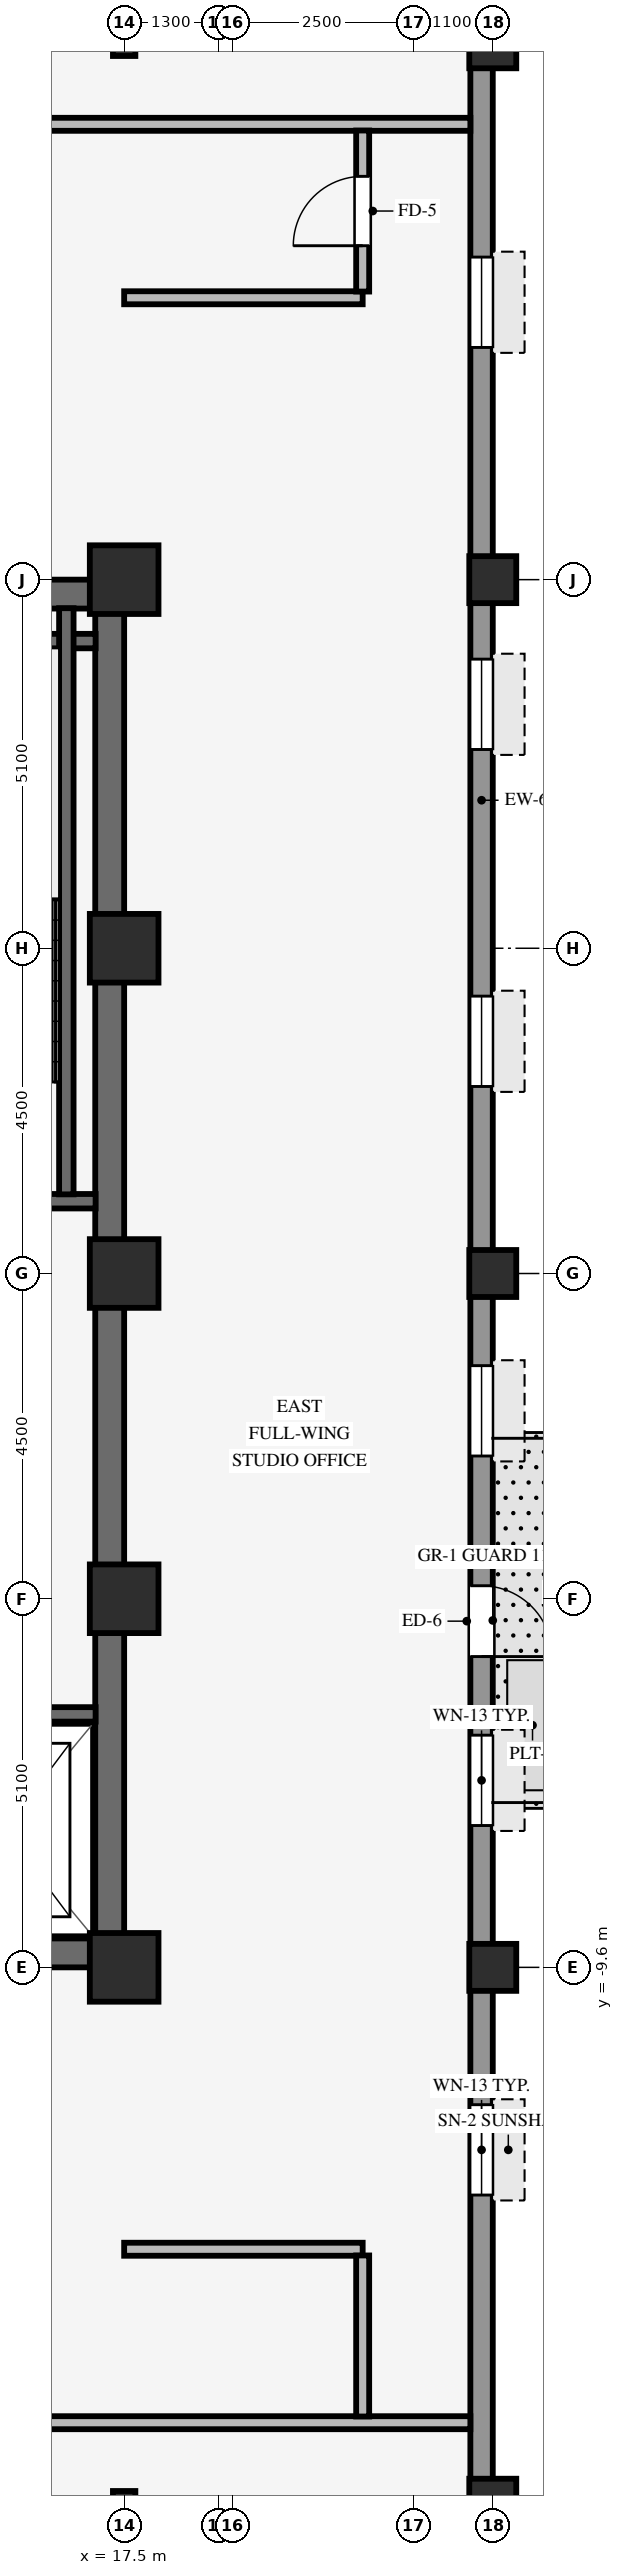
"""IFC4 building model, lengths in metres.
Left out: names, types, materials, properties, quantities, classifications, styles, units other than length and angle.
Written with IfcOpenShell. Run it as: python <this file> out.ifc"""

import sys

from ifc_helpers import new_model, si_unit, direction, frame, frame_2d, origin, origin_2d, place, context, subcontext, project, spatial, rectangle, hollow_rectangle, i_section, extrude, source, transform, mapped, element, fill, save


model = new_model("IFC4")
c1 = context("Model", 3, precision=1e-05, world=origin(), true_north=direction((0.0, 1.0)))
c2 = subcontext(c1, "Body", "Model", "MODEL_VIEW")
j1 = project(units=[si_unit("LENGTHUNIT", "METRE"), si_unit("PLANEANGLEUNIT", "RADIAN")], contexts=[c1])
p1 = place(None, origin())
s1 = spatial("IfcSite", under=j1, at=p1, CompositionType="ELEMENT")
p2 = place(p1, origin())
s2 = spatial("IfcBuilding", under=s1, at=p2, CompositionType="ELEMENT")
p3 = place(p2, frame((0.0, 0.0, 171.3)))
s3 = spatial("IfcBuildingStorey", under=s2, at=p3, CompositionType="ELEMENT", Elevation=171.3)
for number, where, z_axis, x_axis in (
    (1, (9.0, -9.4, 0.0), (0.0, 0.0, 1.0), (1.0, 0.0, 0.0)),
    (2, (9.0, 9.4, 0.0), (0.0, 0.0, 1.0), (1.0, 0.0, 0.0)),
):
    element("IfcWall", number, at=place(p3, frame(where, z_axis=z_axis, x_axis=x_axis)), inside=s3, PredefinedType="SHEAR", context=c2, shape_type="SweptSolid", body=[
        extrude(rectangle(XDim=8.5, YDim=0.4, at=frame_2d((4.25, 0.0))), origin(), (0.0, 0.0, 1.0), 3.37),
    ])
p4 = place(p3, frame((17.3, -9.205, 0.0), z_axis=(0.0, 0.0, 1.0), x_axis=(0.0, 1.0, 0.0)))
e3 = element("IfcWall", 3, at=p4, inside=s3, PredefinedType="SHEAR", context=c2, shape_type="SweptSolid", body=[
    extrude(rectangle(XDim=18.41, YDim=0.4, at=frame_2d((9.205, 0.0))), origin(), (0.0, 0.0, 1.0), 3.37),
])
for number, where, z_axis, x_axis in (
    (4, (17.5, -9.6, 0.0), (0.0, 0.0, 1.0), (1.0, 0.0, 0.0)),
    (5, (17.5, -4.5, 0.0), (0.0, 0.0, 1.0), (1.0, 0.0, 0.0)),
    (6, (17.5, 4.5, 0.0), (0.0, 0.0, 1.0), (1.0, 0.0, 0.0)),
    (7, (17.5, 9.6, 0.0), (0.0, 0.0, 1.0), (1.0, 0.0, 0.0)),
    (8, (17.5, 0.0, 0.0), (0.0, 0.0, 1.0), (1.0, 0.0, 0.0)),
):
    element("IfcColumn", number, at=place(p3, frame(where, z_axis=z_axis, x_axis=x_axis)), inside=s3, PredefinedType="COLUMN", context=c2, shape_type="SweptSolid", body=[
        extrude(rectangle(XDim=0.95, YDim=0.95, at=origin_2d()), origin(), (0.0, 0.0, 1.0), 3.37),
    ])
for number, where, z_axis, x_axis in (
    (9, (22.6, -17.0, 0.0), (0.0, 0.0, 1.0), (1.0, 0.0, 0.0)),
    (10, (22.6, -9.6, 0.0), (0.0, 0.0, 1.0), (1.0, 0.0, 0.0)),
    (11, (22.6, 0.0, 0.0), (0.0, 0.0, 1.0), (1.0, 0.0, 0.0)),
    (12, (22.6, 9.6, 0.0), (0.0, 0.0, 1.0), (1.0, 0.0, 0.0)),
    (13, (22.6, 17.0, 0.0), (0.0, 0.0, 1.0), (1.0, 0.0, 0.0)),
):
    element("IfcColumn", number, at=place(p3, frame(where, z_axis=z_axis, x_axis=x_axis)), inside=s3, PredefinedType="COLUMN", context=c2, shape_type="SweptSolid", body=[
        extrude(hollow_rectangle(XDim=0.65, YDim=0.65, WallThickness=0.04, InnerFilletRadius=0.04, OuterFilletRadius=0.08, at=origin_2d()), origin(), (0.0, 0.0, 1.0), 3.37),
    ])
for number, where, z_axis, x_axis in (
    (14, (17.5, -17.0, 0.0), (0.0, 0.0, 1.0), (1.0, 0.0, 0.0)),
    (15, (17.5, 17.0, 0.0), (0.0, 0.0, 1.0), (1.0, 0.0, 0.0)),
):
    element("IfcColumn", number, at=place(p3, frame(where, z_axis=z_axis, x_axis=x_axis)), inside=s3, PredefinedType="COLUMN", context=c2, shape_type="SweptSolid", body=[
        extrude(i_section(OverallWidth=0.31, OverallDepth=0.31, WebThickness=0.015, FlangeThickness=0.015, FilletRadius=0.015, at=origin_2d()), origin(), (0.0, 0.0, 1.0), 3.37),
    ])
p5 = place(p3, frame((22.445, -20.794, 0.0), z_axis=(0.0, 0.0, 1.0), x_axis=(0.0, 1.0, 0.0)))
e16 = element("IfcWall", 16, at=p5, inside=s3, PredefinedType="STANDARD", context=c2, shape_type="SweptSolid", body=[
    extrude(rectangle(XDim=37.788, YDim=0.31, at=frame_2d((18.894, 0.0))), origin(), (0.0, 0.0, 1.0), 2.705),
])
p6 = place(p5, frame((16.474, 0.0, 0.0), z_axis=(0.0, 0.0, 1.0), x_axis=(-1.0, 0.0, 0.0)))
e17 = element("IfcOpeningElement", 17, at=p6, cuts=e16, PredefinedType="OPENING", context=c2, shape_type="SweptSolid", body=[
    extrude(rectangle(XDim=0.98, YDim=2.15, at=frame_2d((0.49, 1.075))), frame((0.0, 0.165, 0.0), z_axis=(0.0, -1.0, 0.0), x_axis=(1.0, 0.0, 0.0)), (0.0, 0.0, 1.0), 0.33),
])
p7 = place(p5, frame((1.581, 0.0, 0.8)))
e18 = element("IfcOpeningElement", 18, at=p7, cuts=e16, PredefinedType="OPENING", context=c2, shape_type="SweptSolid", body=[
    extrude(rectangle(XDim=1.25, YDim=1.52, at=frame_2d((0.625, 0.76))), frame((0.0, 0.165, 0.0), z_axis=(0.0, -1.0, 0.0), x_axis=(1.0, 0.0, 0.0)), (0.0, 0.0, 1.0), 0.33),
])
p8 = place(p5, frame((8.044, 0.0, 0.8)))
e19 = element("IfcOpeningElement", 19, at=p8, cuts=e16, PredefinedType="OPENING", context=c2, shape_type="SweptSolid", body=[
    extrude(rectangle(XDim=1.25, YDim=1.52, at=frame_2d((0.625, 0.76))), frame((0.0, 0.165, 0.0), z_axis=(0.0, -1.0, 0.0), x_axis=(1.0, 0.0, 0.0)), (0.0, 0.0, 1.0), 0.33),
])
p9 = place(p5, frame((13.156, 0.0, 0.8)))
e20 = element("IfcOpeningElement", 20, at=p9, cuts=e16, PredefinedType="OPENING", context=c2, shape_type="SweptSolid", body=[
    extrude(rectangle(XDim=1.25, YDim=1.52, at=frame_2d((0.625, 0.76))), frame((0.0, 0.165, 0.0), z_axis=(0.0, -1.0, 0.0), x_axis=(1.0, 0.0, 0.0)), (0.0, 0.0, 1.0), 0.33),
])
p10 = place(p5, frame((18.269, 0.0, 0.8)))
e21 = element("IfcOpeningElement", 21, at=p10, cuts=e16, PredefinedType="OPENING", context=c2, shape_type="SweptSolid", body=[
    extrude(rectangle(XDim=1.25, YDim=1.52, at=frame_2d((0.625, 0.76))), frame((0.0, 0.165, 0.0), z_axis=(0.0, -1.0, 0.0), x_axis=(1.0, 0.0, 0.0)), (0.0, 0.0, 1.0), 0.33),
])
p11 = place(p5, frame((23.382, 0.0, 0.8)))
e22 = element("IfcOpeningElement", 22, at=p11, cuts=e16, PredefinedType="OPENING", context=c2, shape_type="SweptSolid", body=[
    extrude(rectangle(XDim=1.25, YDim=1.52, at=frame_2d((0.625, 0.76))), frame((0.0, 0.165, 0.0), z_axis=(0.0, -1.0, 0.0), x_axis=(1.0, 0.0, 0.0)), (0.0, 0.0, 1.0), 0.33),
])
p12 = place(p5, frame((28.044, 0.0, 0.8)))
e23 = element("IfcOpeningElement", 23, at=p12, cuts=e16, PredefinedType="OPENING", context=c2, shape_type="SweptSolid", body=[
    extrude(rectangle(XDim=1.25, YDim=1.52, at=frame_2d((0.625, 0.76))), frame((0.0, 0.165, 0.0), z_axis=(0.0, -1.0, 0.0), x_axis=(1.0, 0.0, 0.0)), (0.0, 0.0, 1.0), 0.33),
])
p13 = place(p5, frame((33.607, 0.0, 0.8)))
e24 = element("IfcOpeningElement", 24, at=p13, cuts=e16, PredefinedType="OPENING", context=c2, shape_type="SweptSolid", body=[
    extrude(rectangle(XDim=1.25, YDim=1.52, at=frame_2d((0.625, 0.76))), frame((0.0, 0.165, 0.0), z_axis=(0.0, -1.0, 0.0), x_axis=(1.0, 0.0, 0.0)), (0.0, 0.0, 1.0), 0.33),
])
for number, where, z_axis, x_axis in (
    (25, (13.535, 1.0, 0.0), (0.0, 0.0, 1.0), (1.0, 0.0, 0.0)),
    (26, (13.535, 8.75, 0.0), (0.0, 0.0, 1.0), (1.0, 0.0, 0.0)),
):
    element("IfcWall", number, at=place(p3, frame(where, z_axis=z_axis, x_axis=x_axis)), inside=s3, PredefinedType="SHEAR", context=c2, shape_type="SweptSolid", body=[
        extrude(rectangle(XDim=3.57, YDim=0.2, at=frame_2d((1.785, 0.0))), origin(), (0.0, 0.0, 1.0), 3.37),
    ])
p14 = place(p3, frame((16.7, 1.095, 0.0), z_axis=(0.0, 0.0, 1.0), x_axis=(0.0, 1.0, 0.0)))
e27 = element("IfcWall", 27, at=p14, inside=s3, PredefinedType="SHEAR", context=c2, shape_type="SweptSolid", body=[
    extrude(rectangle(XDim=8.11, YDim=0.2, at=frame_2d((4.055, 0.0))), origin(), (0.0, 0.0, 1.0), 3.37),
])
p15 = place(p3, frame((14.645, -6.1, 0.0), z_axis=(0.0, 0.0, 1.0), x_axis=(1.0, 0.0, 0.0)))
e28 = element("IfcWall", 28, at=p15, inside=s3, PredefinedType="SHEAR", context=c2, shape_type="SweptSolid", body=[
    extrude(rectangle(XDim=2.46, YDim=0.2, at=frame_2d((1.23, 0.0))), origin(), (0.0, 0.0, 1.0), 3.37),
])
p16 = place(p3, frame((-26.09, -15.9, 0.0), z_axis=(0.0, 0.0, 1.0), x_axis=(1.0, 0.0, 0.0)))
e29 = element("IfcWall", 29, at=p16, inside=s3, PredefinedType="PARTITIONING", context=c2, shape_type="SweptSolid", body=[
    extrude(rectangle(XDim=48.38, YDim=0.18, at=frame_2d((24.19, 0.0))), origin(), (0.0, 0.0, 1.0), 3.36),
])
p17 = place(p16, frame((26.51, 0.0, 0.0)))
e30 = element("IfcOpeningElement", 30, at=p17, cuts=e29, PredefinedType="OPENING", context=c2, shape_type="SweptSolid", body=[
    extrude(rectangle(XDim=0.96, YDim=2.1, at=frame_2d((0.48, 1.05))), frame((0.0, 0.1, 0.0), z_axis=(0.0, -1.0, 0.0), x_axis=(1.0, 0.0, 0.0)), (0.0, 0.0, 1.0), 0.2),
])
p18 = place(p16, frame((40.51, 0.0, 0.0)))
e31 = element("IfcOpeningElement", 31, at=p18, cuts=e29, PredefinedType="OPENING", context=c2, shape_type="SweptSolid", body=[
    extrude(rectangle(XDim=0.96, YDim=2.1, at=frame_2d((0.48, 1.05))), frame((0.0, 0.1, 0.0), z_axis=(0.0, -1.0, 0.0), x_axis=(1.0, 0.0, 0.0)), (0.0, 0.0, 1.0), 0.2),
])
p19 = place(p16, frame((13.62, 0.0, 0.0)))
e32 = element("IfcOpeningElement", 32, at=p19, cuts=e29, PredefinedType="OPENING", context=c2, shape_type="SweptSolid", body=[
    extrude(rectangle(XDim=0.96, YDim=2.1, at=frame_2d((0.48, 1.05))), frame((0.0, 0.1, 0.0), z_axis=(0.0, -1.0, 0.0), x_axis=(1.0, 0.0, 0.0)), (0.0, 0.0, 1.0), 0.2),
])
for number, where, z_axis, x_axis in (
    (33, (17.5, -13.5, 0.0), (0.0, 0.0, 1.0), (1.0, 0.0, 0.0)),
    (34, (17.5, 13.5, 0.0), (0.0, 0.0, 1.0), (1.0, 0.0, 0.0)),
):
    element("IfcWall", number, at=place(p3, frame(where, z_axis=z_axis, x_axis=x_axis)), inside=s3, PredefinedType="PARTITIONING", context=c2, shape_type="SweptSolid", body=[
        extrude(rectangle(XDim=3.3, YDim=0.18, at=frame_2d((1.65, 0.0))), origin(), (0.0, 0.0, 1.0), 3.008),
    ])
p20 = place(p3, frame((-26.09, 15.9, 0.0), z_axis=(0.0, 0.0, 1.0), x_axis=(1.0, 0.0, 0.0)))
e35 = element("IfcWall", 35, at=p20, inside=s3, PredefinedType="PARTITIONING", context=c2, shape_type="SweptSolid", body=[
    extrude(rectangle(XDim=48.38, YDim=0.18, at=frame_2d((24.19, 0.0))), origin(), (0.0, 0.0, 1.0), 3.36),
])
p21 = place(p20, frame((40.51, 0.0, 0.0)))
e36 = element("IfcOpeningElement", 36, at=p21, cuts=e35, PredefinedType="OPENING", context=c2, shape_type="SweptSolid", body=[
    extrude(rectangle(XDim=0.96, YDim=2.1, at=frame_2d((0.48, 1.05))), frame((0.0, 0.1, 0.0), z_axis=(0.0, -1.0, 0.0), x_axis=(1.0, 0.0, 0.0)), (0.0, 0.0, 1.0), 0.2),
])
p22 = place(p20, frame((19.995, 0.0, 0.0)))
e37 = element("IfcOpeningElement", 37, at=p22, cuts=e35, PredefinedType="OPENING", context=c2, shape_type="SweptSolid", body=[
    extrude(rectangle(XDim=0.96, YDim=2.1, at=frame_2d((0.48, 1.05))), frame((0.0, 0.1, 0.0), z_axis=(0.0, -1.0, 0.0), x_axis=(1.0, 0.0, 0.0)), (0.0, 0.0, 1.0), 0.2),
])
p23 = place(p20, frame((28.45, 0.0, 0.0)))
e38 = element("IfcOpeningElement", 38, at=p23, cuts=e35, PredefinedType="OPENING", context=c2, shape_type="SweptSolid", body=[
    extrude(rectangle(XDim=0.96, YDim=2.1, at=frame_2d((0.48, 1.05))), frame((0.0, 0.1, 0.0), z_axis=(0.0, -1.0, 0.0), x_axis=(1.0, 0.0, 0.0)), (0.0, 0.0, 1.0), 0.2),
])
p24 = place(p20, frame((11.605, 0.0, 0.0)))
e39 = element("IfcOpeningElement", 39, at=p24, cuts=e35, PredefinedType="OPENING", context=c2, shape_type="SweptSolid", body=[
    extrude(rectangle(XDim=0.96, YDim=2.1, at=frame_2d((0.48, 1.05))), frame((0.0, 0.1, 0.0), z_axis=(0.0, -1.0, 0.0), x_axis=(1.0, 0.0, 0.0)), (0.0, 0.0, 1.0), 0.2),
])
p25 = place(p20, frame((2.465, 0.0, 0.0)))
e40 = element("IfcOpeningElement", 40, at=p25, cuts=e35, PredefinedType="OPENING", context=c2, shape_type="SweptSolid", body=[
    extrude(rectangle(XDim=0.96, YDim=2.1, at=frame_2d((0.48, 1.05))), frame((0.0, 0.1, 0.0), z_axis=(0.0, -1.0, 0.0), x_axis=(1.0, 0.0, 0.0)), (0.0, 0.0, 1.0), 0.2),
])
p26 = place(p3, frame((20.8, -15.814, 0.0), z_axis=(0.0, 0.0, 1.0), x_axis=(0.0, 1.0, 0.0)))
e41 = element("IfcWall", 41, at=p26, inside=s3, PredefinedType="PARTITIONING", context=c2, shape_type="SweptSolid", body=[
    extrude(rectangle(XDim=2.228, YDim=0.18, at=frame_2d((1.114, 0.0))), origin(), (0.0, 0.0, 1.0), 3.36),
])
p27 = place(p3, frame((20.8, 13.586, 0.0), z_axis=(0.0, 0.0, 1.0), x_axis=(0.0, 1.0, 0.0)))
e42 = element("IfcWall", 42, at=p27, inside=s3, PredefinedType="PARTITIONING", context=c2, shape_type="SweptSolid", body=[
    extrude(rectangle(XDim=2.228, YDim=0.18, at=frame_2d((1.114, 0.0))), origin(), (0.0, 0.0, 1.0), 3.36),
])
p28 = place(p27, frame((0.634, 0.0, 0.0)))
e43 = element("IfcOpeningElement", 43, at=p28, cuts=e42, PredefinedType="OPENING", context=c2, shape_type="SweptSolid", body=[
    extrude(rectangle(XDim=0.96, YDim=2.1, at=frame_2d((0.48, 1.05))), frame((0.0, 0.1, 0.0), z_axis=(0.0, -1.0, 0.0), x_axis=(1.0, 0.0, 0.0)), (0.0, 0.0, 1.0), 0.2),
])
m1 = source(origin(), c2, "Body", "SweptSolid", [
    extrude(rectangle(XDim=0.98, YDim=2.15, at=frame_2d((0.49, 1.075))), frame((0.0, 0.025, 0.0), z_axis=(0.0, -1.0, 0.0), x_axis=(1.0, 0.0, 0.0)), (0.0, 0.0, 1.0), 0.05),
])
p29 = place(p6, origin())
e44 = element("IfcDoor", 44, at=p29, inside=s3, OperationType="SINGLE_SWING_RIGHT", PredefinedType="DOOR", context=c2, shape_type="MappedRepresentation", body=[
    mapped(m1, transform((0.0, 0.0, 0.0), scale=1.0)),
])
fill(e17, e44)
m2 = source(origin(), c2, "Body", "SweptSolid", [
    extrude(rectangle(XDim=1.25, YDim=1.52, at=frame_2d((0.625, 0.76))), frame((0.0, 0.03, 0.0), z_axis=(0.0, -1.0, 0.0), x_axis=(1.0, 0.0, 0.0)), (0.0, 0.0, 1.0), 0.06),
])
p30 = place(p8, origin())
e45 = element("IfcWindow", 45, at=p30, inside=s3, PartitioningType="SINGLE_PANEL", PredefinedType="WINDOW", context=c2, shape_type="MappedRepresentation", body=[
    mapped(m2, transform((0.0, 0.0, 0.0), scale=1.0)),
])
fill(e19, e45)
p31 = place(p9, origin())
e46 = element("IfcWindow", 46, at=p31, inside=s3, PartitioningType="SINGLE_PANEL", PredefinedType="WINDOW", context=c2, shape_type="MappedRepresentation", body=[
    mapped(m2, transform((0.0, 0.0, 0.0), scale=1.0)),
])
fill(e20, e46)
p32 = place(p10, origin())
e47 = element("IfcWindow", 47, at=p32, inside=s3, PartitioningType="SINGLE_PANEL", PredefinedType="WINDOW", context=c2, shape_type="MappedRepresentation", body=[
    mapped(m2, transform((0.0, 0.0, 0.0), scale=1.0)),
])
fill(e21, e47)
p33 = place(p11, origin())
e48 = element("IfcWindow", 48, at=p33, inside=s3, PartitioningType="SINGLE_PANEL", PredefinedType="WINDOW", context=c2, shape_type="MappedRepresentation", body=[
    mapped(m2, transform((0.0, 0.0, 0.0), scale=1.0)),
])
fill(e22, e48)
p34 = place(p12, origin())
e49 = element("IfcWindow", 49, at=p34, inside=s3, PartitioningType="SINGLE_PANEL", PredefinedType="WINDOW", context=c2, shape_type="MappedRepresentation", body=[
    mapped(m2, transform((0.0, 0.0, 0.0), scale=1.0)),
])
fill(e23, e49)
p35 = place(p13, origin())
e50 = element("IfcWindow", 50, at=p35, inside=s3, PartitioningType="SINGLE_PANEL", PredefinedType="WINDOW", context=c2, shape_type="MappedRepresentation", body=[
    mapped(m2, transform((0.0, 0.0, 0.0), scale=1.0)),
])
fill(e24, e50)
m3 = source(origin(), c2, "Body", "SweptSolid", [
    extrude(rectangle(XDim=0.96, YDim=2.1, at=frame_2d((0.48, 1.05))), frame((0.0, 0.025, 0.0), z_axis=(0.0, -1.0, 0.0), x_axis=(1.0, 0.0, 0.0)), (0.0, 0.0, 1.0), 0.05),
])
p36 = place(p28, origin())
e51 = element("IfcDoor", 51, at=p36, inside=s3, OperationType="SINGLE_SWING_LEFT", PredefinedType="DOOR", context=c2, shape_type="MappedRepresentation", body=[
    mapped(m3, transform((0.0, 0.0, 0.0), scale=1.0)),
])
fill(e43, e51)
save(model, sys.argv[1])
